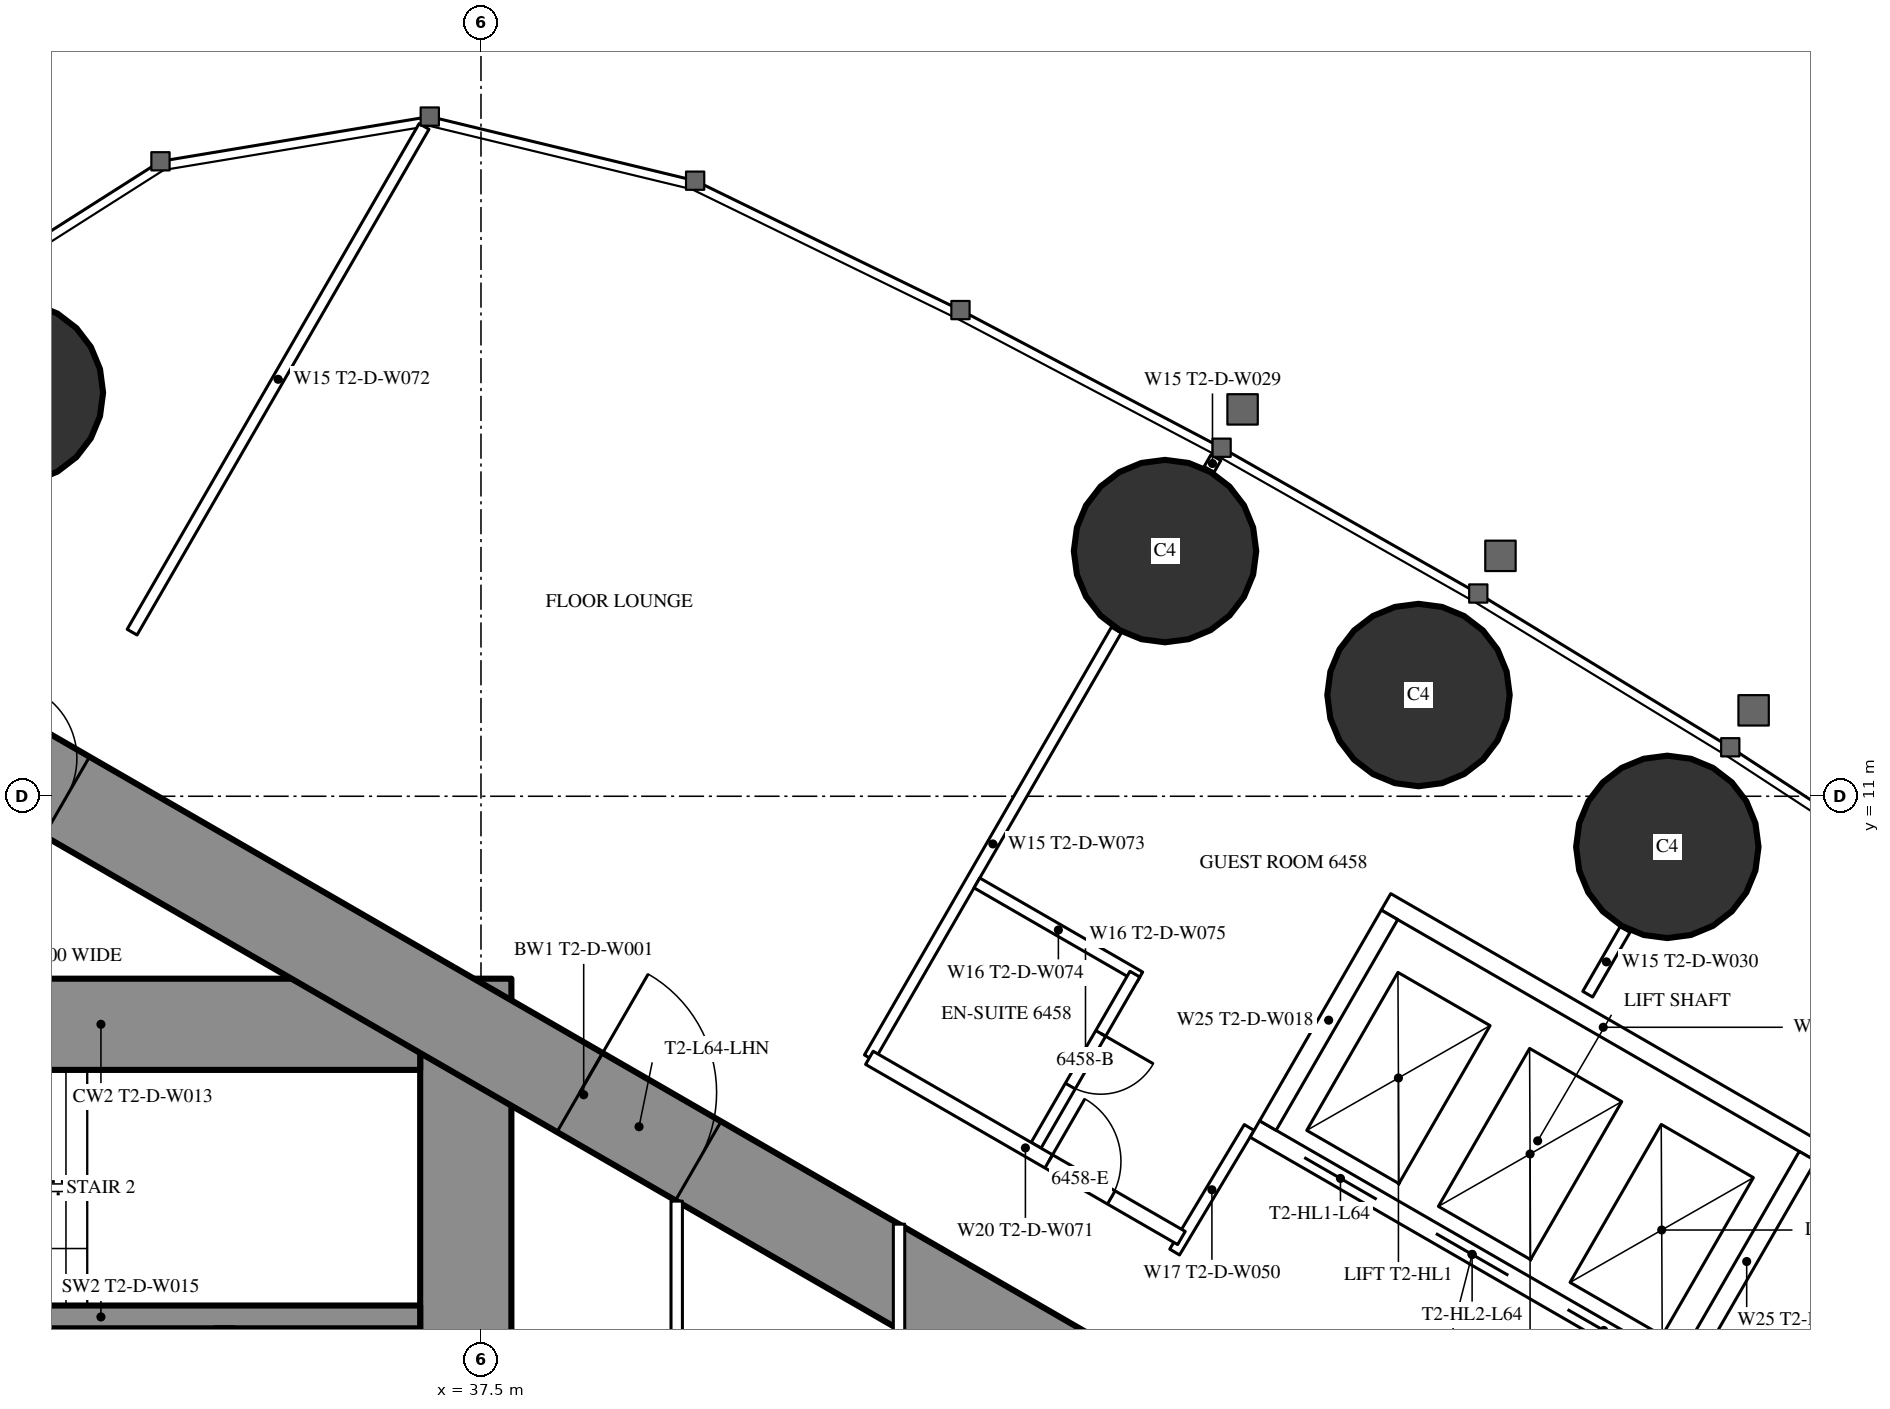
"""IFC4 building model, lengths in metres.
Left out: names, types, materials, properties, quantities, classifications, styles, units other than length and angle.
Written with IfcOpenShell. Run it as: python <this file> out.ifc"""

import sys

from ifc_helpers import new_model, si_unit, direction, frame, frame_2d, origin, origin_2d, place, context, subcontext, project, spatial, rectangle, circle, extrude, element, fill, save


model = new_model("IFC4")
c1 = context("Model", 3, precision=1e-05, world=origin(), true_north=direction((0.0, 1.0)))
c2 = subcontext(c1, "Body", "Model", "MODEL_VIEW")
j1 = project(units=[si_unit("LENGTHUNIT", "METRE"), si_unit("PLANEANGLEUNIT", "RADIAN")], contexts=[c1])
p1 = place(None, origin())
s1 = spatial("IfcSite", under=j1, at=p1, CompositionType="ELEMENT")
p2 = place(p1, origin())
s2 = spatial("IfcBuilding", under=s1, at=p2, CompositionType="ELEMENT")
p3 = place(p2, frame((0.0, 0.0, 240.5)))
s3 = spatial("IfcBuildingStorey", under=s2, at=p3, CompositionType="ELEMENT", Elevation=240.5)
for number, where, z_axis, x_axis in (
    (1, (31.328, 16.311, 0.0), (0.0, 0.0, 1.0), (1.0, 0.0, 0.0)),
    (2, (53.108, 10.334, 0.0), (0.0, 0.0, 1.0), (1.0, 0.0, 0.0)),
    (3, (49.834, 12.332, 0.0), (0.0, 0.0, 1.0), (1.0, 0.0, 0.0)),
    (4, (46.499, 14.226, 0.0), (0.0, 0.0, 1.0), (1.0, 0.0, 0.0)),
):
    element("IfcColumn", number, at=place(p3, frame(where, z_axis=z_axis, x_axis=x_axis)), inside=s3, PredefinedType="COLUMN", context=c2, shape_type="SweptSolid", body=[
        extrude(circle(Radius=1.2, at=origin_2d()), origin(), (0.0, 0.0, 1.0), 3.6),
    ])
p4 = place(p3, frame((37.3, -8.6, 0.0), z_axis=(0.0, 0.0, 1.0), x_axis=(0.0, 1.0, 0.0)))
e5 = element("IfcWall", 5, at=p4, inside=s3, PredefinedType="SHEAR", context=c2, shape_type="SweptSolid", body=[
    extrude(rectangle(XDim=17.2, YDim=1.2, at=frame_2d((8.6, 0.0))), origin(), (0.0, 0.0, 1.0), 3.6),
])
p5 = place(p4, frame((7.7, 0.0, 0.0)))
e6 = element("IfcOpeningElement", 6, at=p5, cuts=e5, PredefinedType="OPENING", context=c2, shape_type="SweptSolid", body=[
    extrude(rectangle(XDim=1.8, YDim=2.2, at=frame_2d((0.9, 1.1))), frame((0.0, 0.61, 0.0), z_axis=(0.0, -1.0, 0.0), x_axis=(1.0, 0.0, 0.0)), (0.0, 0.0, 1.0), 1.22),
])
p6 = place(p3, frame((28.3, 8.0, 0.0), z_axis=(0.0, 0.0, 1.0), x_axis=(1.0, 0.0, 0.0)))
e7 = element("IfcWall", 7, at=p6, inside=s3, PredefinedType="SHEAR", context=c2, shape_type="SweptSolid", body=[
    extrude(rectangle(XDim=8.4, YDim=1.2, at=frame_2d((4.2, 0.0))), origin(), (0.0, 0.0, 1.0), 3.6),
])
p7 = place(p6, frame((0.25, 0.0, 0.0)))
e8 = element("IfcOpeningElement", 8, at=p7, cuts=e7, PredefinedType="OPENING", context=c2, shape_type="SweptSolid", body=[
    extrude(rectangle(XDim=1.0, YDim=2.2, at=frame_2d((0.5, 1.1))), frame((0.0, 0.61, 0.0), z_axis=(0.0, -1.0, 0.0), x_axis=(1.0, 0.0, 0.0)), (0.0, 0.0, 1.0), 1.22),
])
p8 = place(p3, frame((28.3, 4.15, 0.0), z_axis=(0.0, 0.0, 1.0), x_axis=(1.0, 0.0, 0.0)))
e9 = element("IfcWall", 9, at=p8, inside=s3, PredefinedType="SHEAR", context=c2, shape_type="SweptSolid", body=[
    extrude(rectangle(XDim=8.4, YDim=0.3, at=frame_2d((4.2, 0.0))), origin(), (0.0, 0.0, 1.0), 3.6),
])
p9 = place(p3, frame((34.125, 1.65, 0.0), z_axis=(0.0, 0.0, 1.0), x_axis=(0.0, 1.0, 0.0)))
e10 = element("IfcWall", 10, at=p9, inside=s3, PredefinedType="SHEAR", context=c2, shape_type="SweptSolid", body=[
    extrude(rectangle(XDim=2.35, YDim=0.25, at=frame_2d((1.175, 0.0))), origin(), (0.0, 0.0, 1.0), 3.6),
])
p10 = place(p3, frame((27.2, 13.8, 0.0), z_axis=(0.0, 0.0, 1.0), x_axis=(0.866024515034, -0.500001539357, 0.0)))
e11 = element("IfcWall", 11, at=p10, inside=s3, PredefinedType="SHEAR", context=c2, shape_type="SweptSolid", body=[
    extrude(rectangle(XDim=26.907, YDim=1.2, at=frame_2d((13.454, 0.0))), origin(), (0.0, 0.0, 1.0), 3.6),
])
p11 = place(p10, frame((4.6, 0.0, 0.0)))
e12 = element("IfcOpeningElement", 12, at=p11, cuts=e11, PredefinedType="OPENING", context=c2, shape_type="SweptSolid", body=[
    extrude(rectangle(XDim=1.0, YDim=2.2, at=frame_2d((0.5, 1.1))), frame((0.0, 0.61, 0.0), z_axis=(0.0, -1.0, 0.0), x_axis=(1.0, 0.0, 0.0)), (0.0, 0.0, 1.0), 1.22),
])
p12 = place(p10, frame((13.395, 0.0, 0.0)))
e13 = element("IfcOpeningElement", 13, at=p12, cuts=e11, PredefinedType="OPENING", context=c2, shape_type="SweptSolid", body=[
    extrude(rectangle(XDim=1.8, YDim=2.2, at=frame_2d((0.9, 1.1))), frame((0.0, 0.61, 0.0), z_axis=(0.0, -1.0, 0.0), x_axis=(1.0, 0.0, 0.0)), (0.0, 0.0, 1.0), 1.22),
])
p13 = place(p3, frame((32.91, 13.159, 0.0), z_axis=(0.0, 0.0, 1.0), x_axis=(0.500014963534, 0.866016764412, 0.0)))
e14 = element("IfcWall", 14, at=p13, inside=s3, PredefinedType="PARTITIONING", context=c2, shape_type="SweptSolid", body=[
    extrude(rectangle(XDim=7.682, YDim=0.15, at=frame_2d((3.841, 0.0))), origin(), (0.0, 0.0, 1.0), 3.35),
])
p14 = place(p3, frame((42.61, 7.559, 0.0), z_axis=(0.0, 0.0, 1.0), x_axis=(0.500014058812, 0.866017286774, 0.0)))
e15 = element("IfcWall", 15, at=p14, inside=s3, PredefinedType="PARTITIONING", context=c2, shape_type="SweptSolid", body=[
    extrude(rectangle(XDim=6.498, YDim=0.15, at=frame_2d((3.249, 0.0))), origin(), (0.0, 0.0, 1.0), 2.45),
])
p15 = place(p3, frame((47.079, 15.3, 0.0), z_axis=(0.0, 0.0, 1.0), x_axis=(0.499212083968, 0.866479829667, 0.0)))
e16 = element("IfcWall", 16, at=p15, inside=s3, PredefinedType="PARTITIONING", context=c2, shape_type="SweptSolid", body=[
    extrude(rectangle(XDim=0.179, YDim=0.15, at=frame_2d((0.09, 0.0))), origin(), (0.0, 0.0, 1.0), 2.45),
])
p16 = place(p3, frame((52.06, 8.396, 0.0), z_axis=(0.0, 0.0, 1.0), x_axis=(0.500095379624, 0.865970329329, 0.0)))
e17 = element("IfcWall", 17, at=p16, inside=s3, PredefinedType="PARTITIONING", context=c2, shape_type="SweptSolid", body=[
    extrude(rectangle(XDim=0.982, YDim=0.15, at=frame_2d((0.491, 0.0))), origin(), (0.0, 0.0, 1.0), 3.35),
])
p17 = place(p3, frame((47.606, 6.642, 0.0), z_axis=(0.0, 0.0, 1.0), x_axis=(-0.51353662755, -0.858067673418, 0.0)))
e18 = element("IfcWall", 18, at=p17, inside=s3, PredefinedType="PARTITIONING", context=c2, shape_type="SweptSolid", body=[
    extrude(rectangle(XDim=1.91, YDim=0.15, at=frame_2d((0.955, 0.0))), origin(), (0.0, 0.0, 1.0), 3.35),
])
p18 = place(p3, frame((44.025, 9.86, 0.0), z_axis=(0.0, 0.0, 1.0), x_axis=(0.866006523861, -0.500032699561, 0.0)))
e19 = element("IfcWall", 19, at=p18, inside=s3, PredefinedType="PARTITIONING", context=c2, shape_type="SweptSolid", body=[
    extrude(rectangle(XDim=2.475, YDim=0.15, at=frame_2d((1.237, 0.0))), origin(), (0.0, 0.0, 1.0), 3.35),
])
p19 = place(p3, frame((44.803, 6.408, 0.0), z_axis=(0.0, 0.0, 1.0), x_axis=(0.500047596559, 0.865997922154, 0.0)))
e20 = element("IfcWall", 20, at=p19, inside=s3, PredefinedType="PARTITIONING", context=c2, shape_type="SweptSolid", body=[
    extrude(rectangle(XDim=2.6, YDim=0.15, at=frame_2d((1.3, 0.0))), origin(), (0.0, 0.0, 1.0), 3.35),
])
p20 = place(p19, frame((0.9, 0.0, 0.0)))
e21 = element("IfcOpeningElement", 21, at=p20, cuts=e20, PredefinedType="OPENING", context=c2, shape_type="SweptSolid", body=[
    extrude(rectangle(XDim=0.8, YDim=2.2, at=frame_2d((0.4, 1.1))), frame((0.0, 0.085, 0.0), z_axis=(0.0, -1.0, 0.0), x_axis=(1.0, 0.0, 0.0)), (0.0, 0.0, 1.0), 0.17),
])
p21 = place(p3, frame((42.61, 7.559, 0.0), z_axis=(0.0, 0.0, 1.0), x_axis=(0.866032081755, -0.499988433238, 0.0)))
e22 = element("IfcWall", 22, at=p21, inside=s3, PredefinedType="PARTITIONING", context=c2, shape_type="SweptSolid", body=[
    extrude(rectangle(XDim=4.741, YDim=0.2, at=frame_2d((2.37, 0.0))), origin(), (0.0, 0.0, 1.0), 3.35),
])
p22 = place(p21, frame((2.725, 0.0, 0.0)))
e23 = element("IfcOpeningElement", 23, at=p22, cuts=e22, PredefinedType="OPENING", context=c2, shape_type="SweptSolid", body=[
    extrude(rectangle(XDim=0.95, YDim=2.2, at=frame_2d((0.475, 1.1))), frame((0.0, 0.11, 0.0), z_axis=(0.0, -1.0, 0.0), x_axis=(1.0, 0.0, 0.0)), (0.0, 0.0, 1.0), 0.22),
])
p23 = place(p3, frame((40.075, -5.674, 0.0), z_axis=(0.0, 0.0, 1.0), x_axis=(0.0, 1.0, 0.0)))
e24 = element("IfcWall", 24, at=p23, inside=s3, PredefinedType="PARTITIONING", context=c2, shape_type="SweptSolid", body=[
    extrude(rectangle(XDim=11.348, YDim=0.15, at=frame_2d((5.674, 0.0))), origin(), (0.0, 0.0, 1.0), 3.35),
])
p24 = place(p23, frame((4.774, 0.0, 0.0)))
e25 = element("IfcOpeningElement", 25, at=p24, cuts=e24, PredefinedType="OPENING", context=c2, shape_type="SweptSolid", body=[
    extrude(rectangle(XDim=1.8, YDim=2.2, at=frame_2d((0.9, 1.1))), frame((0.0, 0.085, 0.0), z_axis=(0.0, -1.0, 0.0), x_axis=(1.0, 0.0, 0.0)), (0.0, 0.0, 1.0), 0.17),
])
p25 = place(p3, frame((43.0, -5.371, 0.0), z_axis=(0.0, 0.0, 1.0), x_axis=(0.0, 1.0, 0.0)))
e26 = element("IfcWall", 26, at=p25, inside=s3, PredefinedType="PARTITIONING", context=c2, shape_type="SweptSolid", body=[
    extrude(rectangle(XDim=10.741, YDim=0.15, at=frame_2d((5.371, 0.0))), origin(), (0.0, 0.0, 1.0), 3.35),
])
p26 = place(p25, frame((2.185, 0.0, 0.0)))
e27 = element("IfcOpeningElement", 27, at=p26, cuts=e26, PredefinedType="OPENING", context=c2, shape_type="SweptSolid", body=[
    extrude(rectangle(XDim=1.0, YDim=2.2, at=frame_2d((0.5, 1.1))), frame((0.0, 0.085, 0.0), z_axis=(0.0, -1.0, 0.0), x_axis=(1.0, 0.0, 0.0)), (0.0, 0.0, 1.0), 0.17),
])
p27 = place(p25, frame((7.556, 0.0, 0.0)))
e28 = element("IfcOpeningElement", 28, at=p27, cuts=e26, PredefinedType="OPENING", context=c2, shape_type="SweptSolid", body=[
    extrude(rectangle(XDim=1.0, YDim=2.2, at=frame_2d((0.5, 1.1))), frame((0.0, 0.085, 0.0), z_axis=(0.0, -1.0, 0.0), x_axis=(1.0, 0.0, 0.0)), (0.0, 0.0, 1.0), 0.17),
])
p28 = place(p3, frame((47.681, 6.622, 0.0), z_axis=(0.0, 0.0, 1.0), x_axis=(0.86603344179, -0.499986077507, 0.0)))
e29 = element("IfcWall", 29, at=p28, inside=s3, PredefinedType="PARTITIONING", context=c2, shape_type="SweptSolid", body=[
    extrude(rectangle(XDim=6.6, YDim=0.25, at=frame_2d((3.3, 0.0))), origin(), (0.0, 0.0, 1.0), 3.35),
])
p29 = place(p28, frame((0.75, 0.0, 0.0)))
e30 = element("IfcOpeningElement", 30, at=p29, cuts=e29, PredefinedType="OPENING", context=c2, shape_type="SweptSolid", body=[
    extrude(rectangle(XDim=1.1, YDim=2.2, at=frame_2d((0.55, 1.1))), frame((0.0, 0.135, 0.0), z_axis=(0.0, -1.0, 0.0), x_axis=(1.0, 0.0, 0.0)), (0.0, 0.0, 1.0), 0.27),
])
p30 = place(p28, frame((2.75, 0.0, 0.0)))
e31 = element("IfcOpeningElement", 31, at=p30, cuts=e29, PredefinedType="OPENING", context=c2, shape_type="SweptSolid", body=[
    extrude(rectangle(XDim=1.1, YDim=2.2, at=frame_2d((0.55, 1.1))), frame((0.0, 0.135, 0.0), z_axis=(0.0, -1.0, 0.0), x_axis=(1.0, 0.0, 0.0)), (0.0, 0.0, 1.0), 0.27),
])
p31 = place(p28, frame((4.75, 0.0, 0.0)))
e32 = element("IfcOpeningElement", 32, at=p31, cuts=e29, PredefinedType="OPENING", context=c2, shape_type="SweptSolid", body=[
    extrude(rectangle(XDim=1.1, YDim=2.2, at=frame_2d((0.55, 1.1))), frame((0.0, 0.135, 0.0), z_axis=(0.0, -1.0, 0.0), x_axis=(1.0, 0.0, 0.0)), (0.0, 0.0, 1.0), 0.27),
])
p32 = place(p3, frame((49.406, 9.611, 0.0), z_axis=(0.0, 0.0, 1.0), x_axis=(0.86603344179, -0.499986077507, 0.0)))
e33 = element("IfcWall", 33, at=p32, inside=s3, PredefinedType="PARTITIONING", context=c2, shape_type="SweptSolid", body=[
    extrude(rectangle(XDim=6.6, YDim=0.25, at=frame_2d((3.3, 0.0))), origin(), (0.0, 0.0, 1.0), 3.35),
])
p33 = place(p3, frame((47.852, 6.668, 0.0), z_axis=(0.0, 0.0, 1.0), x_axis=(0.499929347863, 0.866066190972, 0.0)))
e34 = element("IfcWall", 34, at=p33, inside=s3, PredefinedType="PARTITIONING", context=c2, shape_type="SweptSolid", body=[
    extrude(rectangle(XDim=3.201, YDim=0.25, at=frame_2d((1.6, 0.0))), origin(), (0.0, 0.0, 1.0), 3.35),
])
p34 = place(p3, frame((53.352, 3.493, 0.0), z_axis=(0.0, 0.0, 1.0), x_axis=(0.499872130319, 0.866099216793, 0.0)))
e35 = element("IfcWall", 35, at=p34, inside=s3, PredefinedType="PARTITIONING", context=c2, shape_type="SweptSolid", body=[
    extrude(rectangle(XDim=3.2, YDim=0.25, at=frame_2d((1.6, 0.0))), origin(), (0.0, 0.0, 1.0), 3.35),
])
p35 = place(p20, origin())
e36 = element("IfcDoor", 36, at=p35, inside=s3, OperationType="SINGLE_SWING_RIGHT", PredefinedType="DOOR", context=c2, shape_type="SweptSolid", body=[
    extrude(rectangle(XDim=0.8, YDim=2.2, at=frame_2d((0.4, 1.1))), frame((0.0, 0.025, 0.0), z_axis=(0.0, -1.0, 0.0), x_axis=(1.0, 0.0, 0.0)), (0.0, 0.0, 1.0), 0.05),
])
fill(e21, e36)
p36 = place(p22, origin())
e37 = element("IfcDoor", 37, at=p36, inside=s3, OperationType="SINGLE_SWING_LEFT", PredefinedType="DOOR", context=c2, shape_type="SweptSolid", body=[
    extrude(rectangle(XDim=0.95, YDim=2.2, at=frame_2d((0.475, 1.1))), frame((0.0, 0.025, 0.0), z_axis=(0.0, -1.0, 0.0), x_axis=(1.0, 0.0, 0.0)), (0.0, 0.0, 1.0), 0.05),
])
fill(e23, e37)
p37 = place(p11, origin())
e38 = element("IfcDoor", 38, at=p37, inside=s3, OperationType="SINGLE_SWING_LEFT", PredefinedType="DOOR", context=c2, shape_type="SweptSolid", body=[
    extrude(rectangle(XDim=1.0, YDim=2.2, at=frame_2d((0.5, 1.1))), frame((0.0, 0.025, 0.0), z_axis=(0.0, -1.0, 0.0), x_axis=(1.0, 0.0, 0.0)), (0.0, 0.0, 1.0), 0.05),
])
fill(e12, e38)
p38 = place(p12, origin())
e39 = element("IfcDoor", 39, at=p38, inside=s3, OperationType="DOUBLE_DOOR_SINGLE_SWING", PredefinedType="DOOR", context=c2, shape_type="SweptSolid", body=[
    extrude(rectangle(XDim=1.8, YDim=2.2, at=frame_2d((0.9, 1.1))), frame((0.0, 0.025, 0.0), z_axis=(0.0, -1.0, 0.0), x_axis=(1.0, 0.0, 0.0)), (0.0, 0.0, 1.0), 0.05),
])
fill(e13, e39)
p39 = place(p29, origin())
e40 = element("IfcDoor", 40, at=p39, inside=s3, OperationType="DOUBLE_DOOR_SLIDING", PredefinedType="USERDEFINED", context=c2, shape_type="SweptSolid", body=[
    extrude(rectangle(XDim=1.1, YDim=2.2, at=frame_2d((0.55, 1.1))), frame((0.0, 0.025, 0.0), z_axis=(0.0, -1.0, 0.0), x_axis=(1.0, 0.0, 0.0)), (0.0, 0.0, 1.0), 0.05),
])
fill(e30, e40)
p40 = place(p30, origin())
e41 = element("IfcDoor", 41, at=p40, inside=s3, OperationType="DOUBLE_DOOR_SLIDING", PredefinedType="USERDEFINED", context=c2, shape_type="SweptSolid", body=[
    extrude(rectangle(XDim=1.1, YDim=2.2, at=frame_2d((0.55, 1.1))), frame((0.0, 0.025, 0.0), z_axis=(0.0, -1.0, 0.0), x_axis=(1.0, 0.0, 0.0)), (0.0, 0.0, 1.0), 0.05),
])
fill(e31, e41)
p41 = place(p31, origin())
e42 = element("IfcDoor", 42, at=p41, inside=s3, OperationType="DOUBLE_DOOR_SLIDING", PredefinedType="USERDEFINED", context=c2, shape_type="SweptSolid", body=[
    extrude(rectangle(XDim=1.1, YDim=2.2, at=frame_2d((0.55, 1.1))), frame((0.0, 0.025, 0.0), z_axis=(0.0, -1.0, 0.0), x_axis=(1.0, 0.0, 0.0)), (0.0, 0.0, 1.0), 0.05),
])
fill(e32, e42)
save(model, sys.argv[1])
